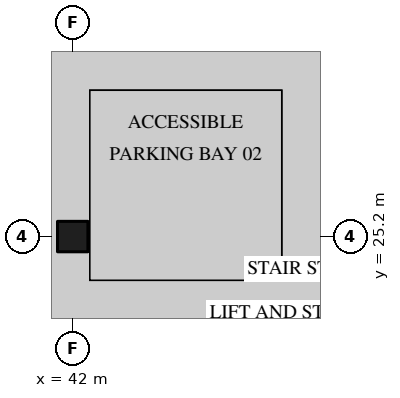
"""IFC4 building model, lengths in metres.
Left out: names, types, materials, properties, quantities, classifications, styles, units other than length and angle.
Written with IfcOpenShell. Run it as: python <this file> out.ifc"""

import sys

from ifc_helpers import new_model, si_unit, direction, frame, origin, origin_2d, place, context, subcontext, project, spatial, rectangle, extrude, element, save


model = new_model("IFC4")
c1 = context("Model", 3, precision=1e-05, world=origin(), true_north=direction((0.0, 1.0)))
c2 = subcontext(c1, "Body", "Model", "MODEL_VIEW")
j1 = project(units=[si_unit("LENGTHUNIT", "METRE"), si_unit("PLANEANGLEUNIT", "RADIAN")], contexts=[c1])
p1 = place(None, origin())
s1 = spatial("IfcSite", under=j1, at=p1, CompositionType="ELEMENT")
p2 = place(p1, origin())
s2 = spatial("IfcBuilding", under=s1, at=p2, CompositionType="ELEMENT")
p3 = place(p2, frame((0.0, 0.0, -4.5)))
s3 = spatial("IfcBuildingStorey", under=s2, at=p3, CompositionType="ELEMENT", Elevation=-4.5)
p4 = place(p3, frame((42.0, 25.2, 0.0), z_axis=(0.0, 0.0, 1.0), x_axis=(1.0, 0.0, 0.0)))
e1 = element("IfcColumn", 1, at=p4, inside=s3, PredefinedType="COLUMN", context=c2, shape_type="SweptSolid", body=[
    extrude(rectangle(XDim=0.8, YDim=0.8, at=origin_2d()), origin(), (0.0, 0.0, 1.0), 4.05),
])
save(model, sys.argv[1])
